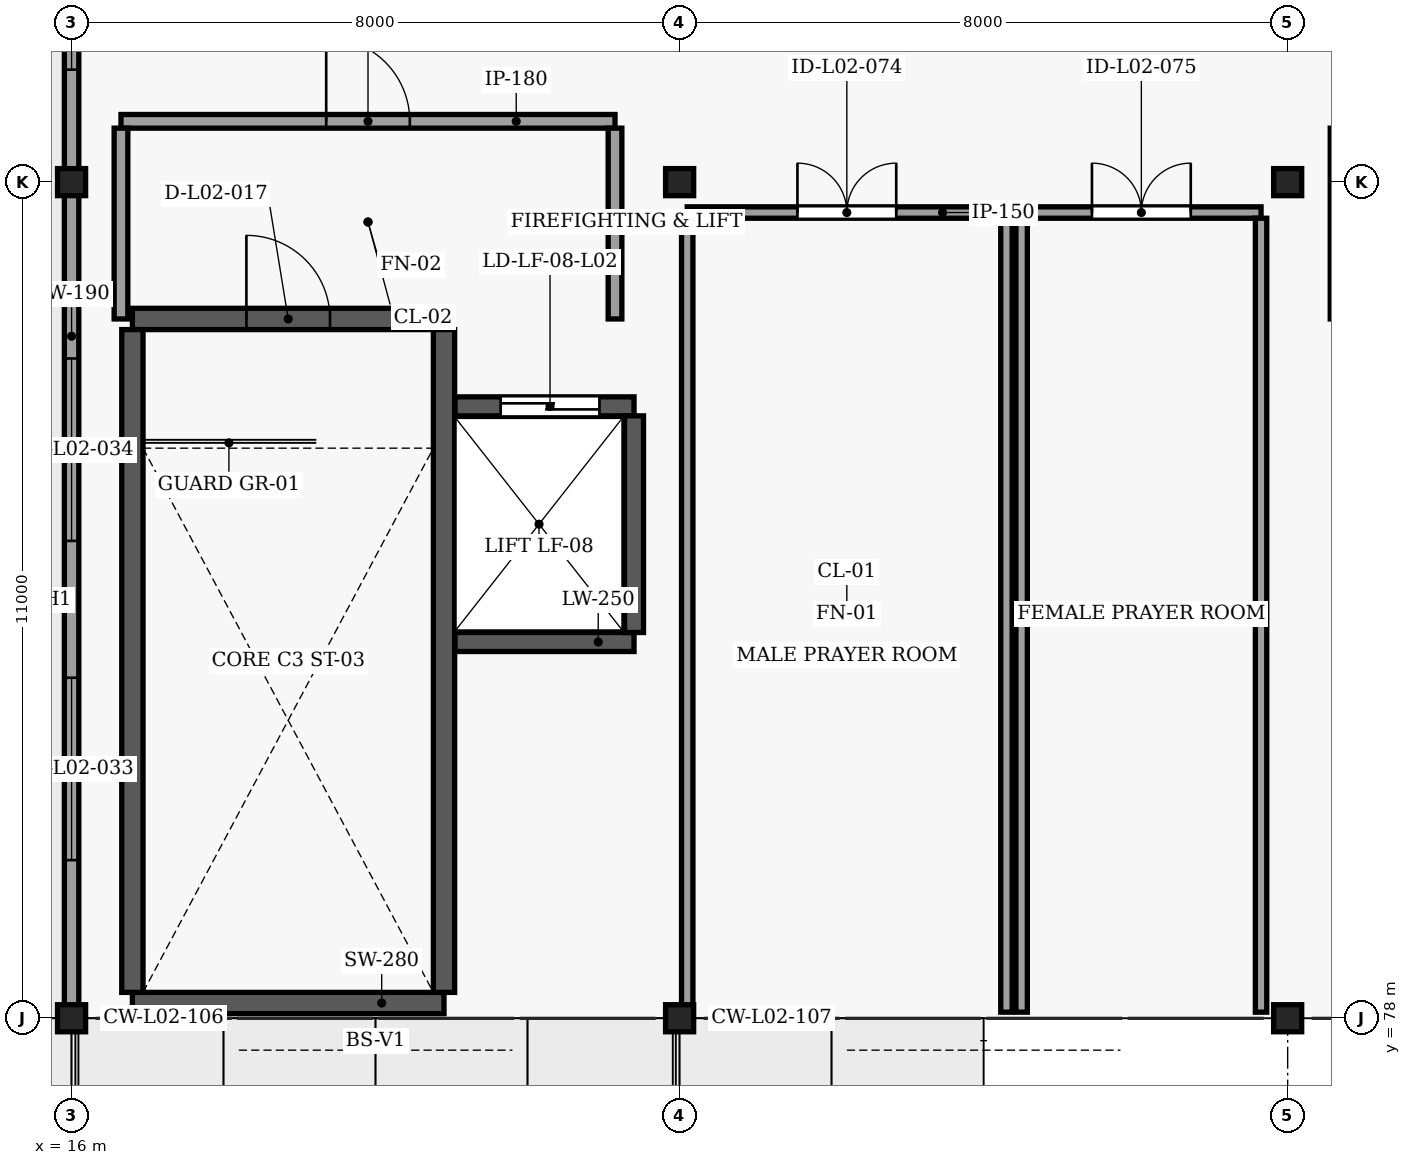
"""IFC4 building model, lengths in metres.
Left out: names, types, materials, properties, quantities, classifications, styles, units other than length and angle.
Written with IfcOpenShell. Run it as: python <this file> out.ifc"""

import sys

from ifc_helpers import new_model, si_unit, direction, frame, frame_2d, origin, origin_2d, place, context, subcontext, project, spatial, rectangle, i_section, extrude, element, fill, save


model = new_model("IFC4")
c1 = context("Model", 3, precision=1e-05, world=origin(), true_north=direction((0.0, 1.0)))
c2 = subcontext(c1, "Body", "Model", "MODEL_VIEW")
j1 = project(units=[si_unit("LENGTHUNIT", "METRE"), si_unit("PLANEANGLEUNIT", "RADIAN")], contexts=[c1])
p1 = place(None, origin())
s1 = spatial("IfcSite", under=j1, at=p1, CompositionType="ELEMENT")
p2 = place(p1, origin())
s2 = spatial("IfcBuilding", under=s1, at=p2, CompositionType="ELEMENT")
p3 = place(p2, frame((0.0, 0.0, 5.4)))
s3 = spatial("IfcBuildingStorey", under=s2, at=p3, CompositionType="ELEMENT", Elevation=5.4)
for number, where, z_axis, x_axis in (
    (1, (16.0, 78.0, 0.0), (0.0, 0.0, 1.0), (1.0, 0.0, 0.0)),
    (2, (24.0, 78.0, 0.0), (0.0, 0.0, 1.0), (1.0, 0.0, 0.0)),
    (3, (32.0, 78.0, 0.0), (0.0, 0.0, 1.0), (1.0, 0.0, 0.0)),
    (4, (16.0, 89.0, 0.0), (0.0, 0.0, 1.0), (1.0, 0.0, 0.0)),
    (5, (24.0, 89.0, 0.0), (0.0, 0.0, 1.0), (1.0, 0.0, 0.0)),
    (6, (32.0, 89.0, 0.0), (0.0, 0.0, 1.0), (1.0, 0.0, 0.0)),
):
    element("IfcColumn", number, at=place(p3, frame(where, z_axis=z_axis, x_axis=x_axis)), inside=s3, PredefinedType="COLUMN", context=c2, shape_type="SweptSolid", body=[
        extrude(i_section(OverallWidth=0.369, OverallDepth=0.356, WebThickness=0.011, FlangeThickness=0.018, FilletRadius=0.015, at=origin_2d()), origin(), (0.0, 0.0, 1.0), 4.56),
    ])
p4 = place(p3, frame((16.8, 78.2, 0.0), z_axis=(0.0, 0.0, 1.0), x_axis=(1.0, 0.0, 0.0)))
e7 = element("IfcWall", 7, at=p4, inside=s3, PredefinedType="SHEAR", context=c2, shape_type="SweptSolid", body=[
    extrude(rectangle(XDim=4.1, YDim=0.28, at=frame_2d((2.05, 0.0))), origin(), (0.0, 0.0, 1.0), 5.7),
])
p5 = place(p3, frame((16.8, 87.2, 0.0), z_axis=(0.0, 0.0, 1.0), x_axis=(1.0, 0.0, 0.0)))
e8 = element("IfcWall", 8, at=p5, inside=s3, PredefinedType="SHEAR", context=c2, shape_type="SweptSolid", body=[
    extrude(rectangle(XDim=4.1, YDim=0.28, at=frame_2d((2.05, 0.0))), origin(), (0.0, 0.0, 1.0), 5.7),
])
p6 = place(p5, frame((1.5, 0.0, 0.0)))
e9 = element("IfcOpeningElement", 9, at=p6, cuts=e8, PredefinedType="OPENING", context=c2, shape_type="SweptSolid", body=[
    extrude(rectangle(XDim=1.1, YDim=2.2, at=frame_2d((0.55, 1.1))), frame((0.0, 0.15, 0.0), z_axis=(0.0, -1.0, 0.0), x_axis=(1.0, 0.0, 0.0)), (0.0, 0.0, 1.0), 0.3),
])
for number, where, z_axis, x_axis in (
    (10, (16.8, 78.34, 0.0), (0.0, 0.0, 1.0), (0.0, 1.0, 0.0)),
    (11, (20.9, 78.34, 0.0), (0.0, 0.0, 1.0), (0.0, 1.0, 0.0)),
):
    element("IfcWall", number, at=place(p3, frame(where, z_axis=z_axis, x_axis=x_axis)), inside=s3, PredefinedType="SHEAR", context=c2, shape_type="SweptSolid", body=[
        extrude(rectangle(XDim=8.72, YDim=0.28, at=frame_2d((4.36, 0.0))), origin(), (0.0, 0.0, 1.0), 5.7),
    ])
p7 = place(p3, frame((21.045, 82.95, 0.0), z_axis=(0.0, 0.0, 1.0), x_axis=(1.0, 0.0, 0.0)))
e12 = element("IfcWall", 12, at=p7, inside=s3, PredefinedType="SOLIDWALL", context=c2, shape_type="SweptSolid", body=[
    extrude(rectangle(XDim=2.355, YDim=0.25, at=frame_2d((1.177, 0.0))), origin(), (0.0, 0.0, 1.0), 6.48),
])
p8 = place(p3, frame((21.045, 86.05, 0.0), z_axis=(0.0, 0.0, 1.0), x_axis=(1.0, 0.0, 0.0)))
e13 = element("IfcWall", 13, at=p8, inside=s3, PredefinedType="SOLIDWALL", context=c2, shape_type="SweptSolid", body=[
    extrude(rectangle(XDim=2.355, YDim=0.25, at=frame_2d((1.177, 0.0))), origin(), (0.0, 0.0, 1.0), 6.48),
])
p9 = place(p8, frame((0.6, 0.0, 0.0)))
e14 = element("IfcOpeningElement", 14, at=p9, cuts=e13, PredefinedType="OPENING", context=c2, shape_type="SweptSolid", body=[
    extrude(rectangle(XDim=1.3, YDim=2.2, at=frame_2d((0.65, 1.1))), frame((0.0, 0.135, 0.0), z_axis=(0.0, -1.0, 0.0), x_axis=(1.0, 0.0, 0.0)), (0.0, 0.0, 1.0), 0.27),
])
p10 = place(p3, frame((23.4, 83.075, 0.0), z_axis=(0.0, 0.0, 1.0), x_axis=(0.0, 1.0, 0.0)))
e15 = element("IfcWall", 15, at=p10, inside=s3, PredefinedType="SOLIDWALL", context=c2, shape_type="SweptSolid", body=[
    extrude(rectangle(XDim=2.85, YDim=0.25, at=frame_2d((1.425, 0.0))), origin(), (0.0, 0.0, 1.0), 6.48),
])
p11 = place(p3, frame((16.0, 78.163, 0.0), z_axis=(0.0, 0.0, 1.0), x_axis=(0.0, 1.0, 0.0)))
e16 = element("IfcWall", 16, at=p11, inside=s3, PredefinedType="SOLIDWALL", context=c2, shape_type="SweptSolid", body=[
    extrude(rectangle(XDim=11.012, YDim=0.19, at=frame_2d((5.506, 0.0))), origin(), (0.0, 0.0, 1.0), 4.141),
])
p12 = place(p11, frame((1.917, 0.0, 0.95)))
e17 = element("IfcOpeningElement", 17, at=p12, cuts=e16, PredefinedType="OPENING", context=c2, shape_type="SweptSolid", body=[
    extrude(rectangle(XDim=2.4, YDim=1.6, at=frame_2d((1.2, 0.8))), frame((0.0, 0.105, 0.0), z_axis=(0.0, -1.0, 0.0), x_axis=(1.0, 0.0, 0.0)), (0.0, 0.0, 1.0), 0.21),
])
p13 = place(p11, frame((6.117, 0.0, 0.95)))
e18 = element("IfcOpeningElement", 18, at=p13, cuts=e16, PredefinedType="OPENING", context=c2, shape_type="SweptSolid", body=[
    extrude(rectangle(XDim=2.4, YDim=1.6, at=frame_2d((1.2, 0.8))), frame((0.0, 0.105, 0.0), z_axis=(0.0, -1.0, 0.0), x_axis=(1.0, 0.0, 0.0)), (0.0, 0.0, 1.0), 0.21),
])
p14 = place(p3, frame((16.0, 89.163, 0.0), z_axis=(0.0, 0.0, 1.0), x_axis=(0.0, 1.0, 0.0)))
e19 = element("IfcWall", 19, at=p14, inside=s3, PredefinedType="SOLIDWALL", context=c2, shape_type="SweptSolid", body=[
    extrude(rectangle(XDim=11.012, YDim=0.19, at=frame_2d((5.506, 0.0))), origin(), (0.0, 0.0, 1.0), 4.141),
])
p15 = place(p14, frame((4.417, 0.0, 0.0)))
e20 = element("IfcOpeningElement", 20, at=p15, cuts=e19, PredefinedType="OPENING", context=c2, shape_type="SweptSolid", body=[
    extrude(rectangle(XDim=1.8, YDim=2.25, at=frame_2d((0.9, 1.125))), frame((0.0, 0.105, 0.0), z_axis=(0.0, -1.0, 0.0), x_axis=(1.0, 0.0, 0.0)), (0.0, 0.0, 1.0), 0.21),
])
p16 = place(p14, frame((1.317, 0.0, 0.95)))
e21 = element("IfcOpeningElement", 21, at=p16, cuts=e19, PredefinedType="OPENING", context=c2, shape_type="SweptSolid", body=[
    extrude(rectangle(XDim=1.95, YDim=1.55, at=frame_2d((0.975, 0.775))), frame((0.0, 0.105, 0.0), z_axis=(0.0, -1.0, 0.0), x_axis=(1.0, 0.0, 0.0)), (0.0, 0.0, 1.0), 0.21),
])
p17 = place(p14, frame((7.517, 0.0, 0.95)))
e22 = element("IfcOpeningElement", 22, at=p17, cuts=e19, PredefinedType="OPENING", context=c2, shape_type="SweptSolid", body=[
    extrude(rectangle(XDim=1.5, YDim=1.5, at=frame_2d((0.75, 0.75))), frame((0.0, 0.105, 0.0), z_axis=(0.0, -1.0, 0.0), x_axis=(1.0, 0.0, 0.0)), (0.0, 0.0, 1.0), 0.21),
])
p18 = place(p3, frame((16.65, 89.8, 0.0), z_axis=(0.0, 0.0, 1.0), x_axis=(1.0, 0.0, 0.0)))
e23 = element("IfcWall", 23, at=p18, inside=s3, PredefinedType="SOLIDWALL", context=c2, shape_type="SweptSolid", body=[
    extrude(rectangle(XDim=6.5, YDim=0.18, at=frame_2d((3.25, 0.0))), origin(), (0.0, 0.0, 1.0), 4.5),
])
p19 = place(p18, frame((2.7, 0.0, 0.0)))
e24 = element("IfcOpeningElement", 24, at=p19, cuts=e23, PredefinedType="OPENING", context=c2, shape_type="SweptSolid", body=[
    extrude(rectangle(XDim=1.1, YDim=2.2, at=frame_2d((0.55, 1.1))), frame((0.0, 0.1, 0.0), z_axis=(0.0, -1.0, 0.0), x_axis=(1.0, 0.0, 0.0)), (0.0, 0.0, 1.0), 0.2),
])
for number, where, z_axis, x_axis in (
    (25, (16.65, 87.2, 0.0), (0.0, 0.0, 1.0), (0.0, 1.0, 0.0)),
    (26, (23.15, 87.2, 0.0), (0.0, 0.0, 1.0), (0.0, 1.0, 0.0)),
    (27, (32.65, 87.2, 0.0), (0.0, 0.0, 1.0), (0.0, 1.0, 0.0)),
):
    element("IfcWall", number, at=place(p3, frame(where, z_axis=z_axis, x_axis=x_axis)), inside=s3, PredefinedType="SOLIDWALL", context=c2, shape_type="SweptSolid", body=[
        extrude(rectangle(XDim=2.51, YDim=0.18, at=frame_2d((1.255, 0.0))), origin(), (0.0, 0.0, 1.0), 4.1),
    ])
p20 = place(p3, frame((24.1, 88.6, 0.0), z_axis=(0.0, 0.0, 1.0), x_axis=(1.0, 0.0, 0.0)))
e28 = element("IfcWall", 28, at=p20, inside=s3, PredefinedType="PARTITIONING", context=c2, shape_type="SweptSolid", body=[
    extrude(rectangle(XDim=4.2, YDim=0.15, at=frame_2d((2.1, 0.0))), origin(), (0.0, 0.0, 1.0), 4.5),
])
p21 = place(p20, frame((1.45, 0.0, 0.0)))
e29 = element("IfcOpeningElement", 29, at=p21, cuts=e28, PredefinedType="OPENING", context=c2, shape_type="SweptSolid", body=[
    extrude(rectangle(XDim=1.3, YDim=2.2, at=frame_2d((0.65, 1.1))), frame((0.0, 0.085, 0.0), z_axis=(0.0, -1.0, 0.0), x_axis=(1.0, 0.0, 0.0)), (0.0, 0.0, 1.0), 0.17),
])
p22 = place(p3, frame((24.1, 78.08, 0.0), z_axis=(0.0, 0.0, 1.0), x_axis=(0.0, 1.0, 0.0)))
e30 = element("IfcWall", 30, at=p22, inside=s3, PredefinedType="PARTITIONING", context=c2, shape_type="SweptSolid", body=[
    extrude(rectangle(XDim=10.445, YDim=0.15, at=frame_2d((5.222, 0.0))), origin(), (0.0, 0.0, 1.0), 4.143),
])
p23 = place(p3, frame((28.3, 78.08, 0.0), z_axis=(0.0, 0.0, 1.0), x_axis=(0.0, 1.0, 0.0)))
e31 = element("IfcWall", 31, at=p23, inside=s3, PredefinedType="PARTITIONING", context=c2, shape_type="SweptSolid", body=[
    extrude(rectangle(XDim=10.445, YDim=0.15, at=frame_2d((5.222, 0.0))), origin(), (0.0, 0.0, 1.0), 4.247),
])
p24 = place(p3, frame((28.5, 88.6, 0.0), z_axis=(0.0, 0.0, 1.0), x_axis=(1.0, 0.0, 0.0)))
e32 = element("IfcWall", 32, at=p24, inside=s3, PredefinedType="PARTITIONING", context=c2, shape_type="SweptSolid", body=[
    extrude(rectangle(XDim=3.15, YDim=0.15, at=frame_2d((1.575, 0.0))), origin(), (0.0, 0.0, 1.0), 4.5),
])
p25 = place(p24, frame((0.925, 0.0, 0.0)))
e33 = element("IfcOpeningElement", 33, at=p25, cuts=e32, PredefinedType="OPENING", context=c2, shape_type="SweptSolid", body=[
    extrude(rectangle(XDim=1.3, YDim=2.2, at=frame_2d((0.65, 1.1))), frame((0.0, 0.085, 0.0), z_axis=(0.0, -1.0, 0.0), x_axis=(1.0, 0.0, 0.0)), (0.0, 0.0, 1.0), 0.17),
])
for number, where, z_axis, x_axis in (
    (34, (28.5, 78.08, 0.0), (0.0, 0.0, 1.0), (0.0, 1.0, 0.0)),
    (35, (31.65, 78.08, 0.0), (0.0, 0.0, 1.0), (0.0, 1.0, 0.0)),
):
    element("IfcWall", number, at=place(p3, frame(where, z_axis=z_axis, x_axis=x_axis)), inside=s3, PredefinedType="PARTITIONING", context=c2, shape_type="SweptSolid", body=[
        extrude(rectangle(XDim=10.445, YDim=0.15, at=frame_2d((5.222, 0.0))), origin(), (0.0, 0.0, 1.0), 4.247),
    ])
p26 = place(p6, origin())
e36 = element("IfcDoor", 36, at=p26, inside=s3, OperationType="SINGLE_SWING_LEFT", PredefinedType="DOOR", context=c2, shape_type="SweptSolid", body=[
    extrude(rectangle(XDim=1.1, YDim=2.2, at=frame_2d((0.55, 1.1))), frame((0.0, 0.025, 0.0), z_axis=(0.0, -1.0, 0.0), x_axis=(1.0, 0.0, 0.0)), (0.0, 0.0, 1.0), 0.05),
])
fill(e9, e36)
p27 = place(p9, origin())
e37 = element("IfcDoor", 37, at=p27, inside=s3, OperationType="SLIDING_TO_RIGHT", PredefinedType="DOOR", context=c2, shape_type="SweptSolid", body=[
    extrude(rectangle(XDim=1.3, YDim=2.2, at=frame_2d((0.65, 1.1))), frame((0.0, 0.025, 0.0), z_axis=(0.0, -1.0, 0.0), x_axis=(1.0, 0.0, 0.0)), (0.0, 0.0, 1.0), 0.05),
])
fill(e14, e37)
p28 = place(p12, origin())
e38 = element("IfcWindow", 38, at=p28, inside=s3, PartitioningType="SINGLE_PANEL", PredefinedType="WINDOW", context=c2, shape_type="SweptSolid", body=[
    extrude(rectangle(XDim=2.4, YDim=1.6, at=frame_2d((1.2, 0.8))), frame((0.0, 0.03, 0.0), z_axis=(0.0, -1.0, 0.0), x_axis=(1.0, 0.0, 0.0)), (0.0, 0.0, 1.0), 0.06),
])
fill(e17, e38)
p29 = place(p13, origin())
e39 = element("IfcWindow", 39, at=p29, inside=s3, PartitioningType="SINGLE_PANEL", PredefinedType="WINDOW", context=c2, shape_type="SweptSolid", body=[
    extrude(rectangle(XDim=2.4, YDim=1.6, at=frame_2d((1.2, 0.8))), frame((0.0, 0.03, 0.0), z_axis=(0.0, -1.0, 0.0), x_axis=(1.0, 0.0, 0.0)), (0.0, 0.0, 1.0), 0.06),
])
fill(e18, e39)
p30 = place(p16, origin())
e40 = element("IfcWindow", 40, at=p30, inside=s3, PartitioningType="SINGLE_PANEL", PredefinedType="WINDOW", context=c2, shape_type="SweptSolid", body=[
    extrude(rectangle(XDim=1.95, YDim=1.55, at=frame_2d((0.975, 0.775))), frame((0.0, 0.03, 0.0), z_axis=(0.0, -1.0, 0.0), x_axis=(1.0, 0.0, 0.0)), (0.0, 0.0, 1.0), 0.06),
])
fill(e21, e40)
p31 = place(p19, origin())
e41 = element("IfcDoor", 41, at=p31, inside=s3, OperationType="SINGLE_SWING_LEFT", PredefinedType="DOOR", context=c2, shape_type="SweptSolid", body=[
    extrude(rectangle(XDim=1.1, YDim=2.2, at=frame_2d((0.55, 1.1))), frame((0.0, 0.025, 0.0), z_axis=(0.0, -1.0, 0.0), x_axis=(1.0, 0.0, 0.0)), (0.0, 0.0, 1.0), 0.05),
])
fill(e24, e41)
p32 = place(p21, origin())
e42 = element("IfcDoor", 42, at=p32, inside=s3, OperationType="DOUBLE_DOOR_SINGLE_SWING", PredefinedType="DOOR", context=c2, shape_type="SweptSolid", body=[
    extrude(rectangle(XDim=1.3, YDim=2.2, at=frame_2d((0.65, 1.1))), frame((0.0, 0.025, 0.0), z_axis=(0.0, -1.0, 0.0), x_axis=(1.0, 0.0, 0.0)), (0.0, 0.0, 1.0), 0.05),
])
fill(e29, e42)
p33 = place(p25, origin())
e43 = element("IfcDoor", 43, at=p33, inside=s3, OperationType="DOUBLE_DOOR_SINGLE_SWING", PredefinedType="DOOR", context=c2, shape_type="SweptSolid", body=[
    extrude(rectangle(XDim=1.3, YDim=2.2, at=frame_2d((0.65, 1.1))), frame((0.0, 0.025, 0.0), z_axis=(0.0, -1.0, 0.0), x_axis=(1.0, 0.0, 0.0)), (0.0, 0.0, 1.0), 0.05),
])
fill(e33, e43)
save(model, sys.argv[1])
